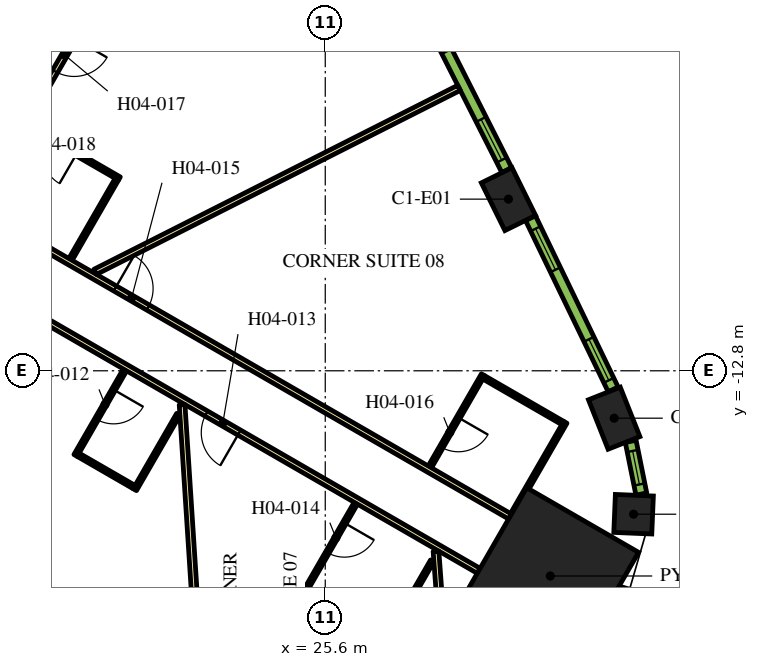
"""IFC4 building model, lengths in metres.
Left out: names, types, materials, properties, quantities, classifications, styles, units other than length and angle.
Written with IfcOpenShell. Run it as: python <this file> out.ifc"""

import sys

from ifc_helpers import new_model, si_unit, direction, frame, frame_2d, origin, origin_2d, place, context, subcontext, project, spatial, rectangle, extrude, element, fill, save


model = new_model("IFC4")
c1 = context("Model", 3, precision=1e-05, world=origin(), true_north=direction((0.0, 1.0)))
c2 = subcontext(c1, "Body", "Model", "MODEL_VIEW")
j1 = project(units=[si_unit("LENGTHUNIT", "METRE"), si_unit("PLANEANGLEUNIT", "RADIAN")], contexts=[c1])
p1 = place(None, origin())
s1 = spatial("IfcSite", under=j1, at=p1, CompositionType="ELEMENT")
p2 = place(p1, origin())
s2 = spatial("IfcBuilding", under=s1, at=p2, CompositionType="ELEMENT")
p3 = place(p2, frame((0.0, 0.0, 66.6)))
s3 = spatial("IfcBuildingStorey", under=s2, at=p3, CompositionType="ELEMENT", Elevation=66.6)
p4 = place(p3, frame((31.522, -18.199, 0.0), z_axis=(0.0, 0.0, 1.0), x_axis=(0.866025403784, -0.5, 0.0)))
e1 = element("IfcColumn", 1, at=p4, inside=s3, PredefinedType="COLUMN", context=c2, shape_type="SweptSolid", body=[
    extrude(rectangle(XDim=3.4, YDim=3.4, at=origin_2d()), origin(), (0.0, 0.0, 1.0), 3.9),
])
p5 = place(p3, frame((33.713, -16.574, 0.0), z_axis=(0.0, 0.0, 1.0), x_axis=(0.041582693819, 0.999135065732, 0.0)))
e2 = element("IfcColumn", 2, at=p5, inside=s3, PredefinedType="COLUMN", context=c2, shape_type="SweptSolid", body=[
    extrude(rectangle(XDim=1.0, YDim=1.0, at=origin_2d()), origin(), (0.0, 0.0, 1.0), 3.9),
])
for number, where, z_axis, x_axis in (
    (3, (33.203, -14.047, 0.0), (0.0, 0.0, 1.0), (-0.369, 0.929, 0.0)),
    (4, (30.421, -8.284, 0.0), (0.0, 0.0, 1.0), (-0.443, 0.897, 0.0)),
):
    element("IfcColumn", number, at=place(p3, frame(where, z_axis=z_axis, x_axis=x_axis)), inside=s3, PredefinedType="COLUMN", context=c2, shape_type="SweptSolid", body=[
        extrude(rectangle(XDim=1.4, YDim=0.9, at=origin_2d()), origin(), (0.0, 0.0, 1.0), 3.9),
    ])
p6 = place(p3, frame((16.412, -8.523, 0.0), z_axis=(0.0, 0.0, 1.0), x_axis=(0.866022197818, -0.500005552856, 0.0)))
e5 = element("IfcWall", 5, at=p6, inside=s3, PredefinedType="PARTITIONING", context=c2, shape_type="SweptSolid", body=[
    extrude(rectangle(XDim=16.224, YDim=0.15, at=frame_2d((8.112, 0.0))), origin(), (0.0, 0.0, 1.0), 2.75),
])
p7 = place(p6, frame((4.223, 0.0, 0.0)))
e6 = element("IfcOpeningElement", 6, at=p7, cuts=e5, PredefinedType="OPENING", context=c2, shape_type="SweptSolid", body=[
    extrude(rectangle(XDim=1.0, YDim=2.1, at=frame_2d((0.5, 1.05))), frame((0.0, 0.085, 0.0), z_axis=(0.0, -1.0, 0.0), x_axis=(1.0, 0.0, 0.0)), (0.0, 0.0, 1.0), 0.17),
])
p8 = place(p3, frame((19.081, -3.9, 0.0), z_axis=(0.0, 0.0, 1.0), x_axis=(-0.499974327079, -0.866040225545, 0.0)))
e7 = element("IfcWall", 7, at=p8, inside=s3, PredefinedType="PARTITIONING", context=c2, shape_type="SweptSolid", body=[
    extrude(rectangle(XDim=5.258, YDim=0.15, at=frame_2d((2.629, 0.0))), origin(), (0.0, 0.0, 1.0), 2.75),
])
p9 = place(p8, frame((0.18, 0.0, 0.0)))
e8 = element("IfcOpeningElement", 8, at=p9, cuts=e7, PredefinedType="OPENING", context=c2, shape_type="SweptSolid", body=[
    extrude(rectangle(XDim=1.0, YDim=2.1, at=frame_2d((0.5, 1.05))), frame((0.0, 0.085, 0.0), z_axis=(0.0, -1.0, 0.0), x_axis=(1.0, 0.0, 0.0)), (0.0, 0.0, 1.0), 0.17),
])
p10 = place(p3, frame((29.638, -18.064, 0.0), z_axis=(0.0, 0.0, 1.0), x_axis=(-0.866026175601, 0.499998663172, 0.0)))
e9 = element("IfcWall", 9, at=p10, inside=s3, PredefinedType="PARTITIONING", context=c2, shape_type="SweptSolid", body=[
    extrude(rectangle(XDim=16.144, YDim=0.15, at=frame_2d((8.072, 0.0))), origin(), (0.0, 0.0, 1.0), 2.75),
])
p11 = place(p10, frame((14.714, 0.0, 0.0)))
e10 = element("IfcOpeningElement", 10, at=p11, cuts=e9, PredefinedType="OPENING", context=c2, shape_type="SweptSolid", body=[
    extrude(rectangle(XDim=1.0, YDim=2.1, at=frame_2d((0.5, 1.05))), frame((0.0, 0.085, 0.0), z_axis=(0.0, -1.0, 0.0), x_axis=(1.0, 0.0, 0.0)), (0.0, 0.0, 1.0), 0.17),
])
p12 = place(p10, frame((7.275, 0.0, 0.0)))
e11 = element("IfcOpeningElement", 11, at=p12, cuts=e9, PredefinedType="OPENING", context=c2, shape_type="SweptSolid", body=[
    extrude(rectangle(XDim=1.0, YDim=2.1, at=frame_2d((0.5, 1.05))), frame((0.0, 0.085, 0.0), z_axis=(0.0, -1.0, 0.0), x_axis=(1.0, 0.0, 0.0)), (0.0, 0.0, 1.0), 0.17),
])
p13 = place(p3, frame((29.12, -5.356, 0.0), z_axis=(0.0, 0.0, 1.0), x_axis=(-0.892401965553, -0.451241323327, 0.0)))
e12 = element("IfcWall", 12, at=p13, inside=s3, PredefinedType="PARTITIONING", context=c2, shape_type="SweptSolid", body=[
    extrude(rectangle(XDim=10.729, YDim=0.15, at=frame_2d((5.364, 0.0))), origin(), (0.0, 0.0, 1.0), 2.75),
])
p14 = place(p3, frame((22.355, -21.754, 0.0), z_axis=(0.0, 0.0, 1.0), x_axis=(-0.064639533143, 0.997908678565, 0.0)))
e13 = element("IfcWall", 13, at=p14, inside=s3, PredefinedType="PARTITIONING", context=c2, shape_type="SweptSolid", body=[
    extrude(rectangle(XDim=8.079, YDim=0.15, at=frame_2d((4.04, 0.0))), origin(), (0.0, 0.0, 1.0), 2.75),
])
p15 = place(p3, frame((28.79, -21.273, 0.0), z_axis=(0.0, 0.0, 1.0), x_axis=(-0.07382592098, 0.997271143366, 0.0)))
e14 = element("IfcWall", 14, at=p15, inside=s3, PredefinedType="PARTITIONING", context=c2, shape_type="SweptSolid", body=[
    extrude(rectangle(XDim=3.734, YDim=0.15, at=frame_2d((1.867, 0.0))), origin(), (0.0, 0.0, 1.0), 2.75),
])
p16 = place(p3, frame((20.33, -12.777, 0.0), z_axis=(0.0, 0.0, 1.0), x_axis=(-0.500006934395, -0.866021400173, 0.0)))
e15 = element("IfcWall", 15, at=p16, inside=s3, PredefinedType="PARTITIONING", context=c2, shape_type="SweptSolid", body=[
    extrude(rectangle(XDim=2.6, YDim=0.1, at=frame_2d((1.3, 0.0))), origin(), (0.0, 0.0, 1.0), 2.75),
])
p17 = place(p16, frame((0.6, 0.0, 0.0)))
e16 = element("IfcOpeningElement", 16, at=p17, cuts=e15, PredefinedType="OPENING", context=c2, shape_type="SweptSolid", body=[
    extrude(rectangle(XDim=0.9, YDim=2.1, at=frame_2d((0.45, 1.05))), frame((0.0, 0.06, 0.0), z_axis=(0.0, -1.0, 0.0), x_axis=(1.0, 0.0, 0.0)), (0.0, 0.0, 1.0), 0.12),
])
p18 = place(p3, frame((19.098, -15.01, 0.0), z_axis=(0.0, 0.0, 1.0), x_axis=(0.86605165483, -0.499954529098, 0.0)))
e17 = element("IfcWall", 17, at=p18, inside=s3, PredefinedType="PARTITIONING", context=c2, shape_type="SweptSolid", body=[
    extrude(rectangle(XDim=1.7, YDim=0.1, at=frame_2d((0.85, 0.0))), origin(), (0.0, 0.0, 1.0), 2.75),
])
p19 = place(p3, frame((21.734, -13.945, 0.0), z_axis=(0.0, 0.0, 1.0), x_axis=(-0.500014693593, -0.866016920268, 0.0)))
e18 = element("IfcWall", 18, at=p19, inside=s3, PredefinedType="PARTITIONING", context=c2, shape_type="SweptSolid", body=[
    extrude(rectangle(XDim=2.29, YDim=0.1, at=frame_2d((1.145, 0.0))), origin(), (0.0, 0.0, 1.0), 2.75),
])
p20 = place(p3, frame((26.405, -16.284, 0.0), z_axis=(0.0, 0.0, 1.0), x_axis=(-0.49998411664, -0.866034573852, 0.0)))
e19 = element("IfcWall", 19, at=p20, inside=s3, PredefinedType="PARTITIONING", context=c2, shape_type="SweptSolid", body=[
    extrude(rectangle(XDim=2.8, YDim=0.1, at=frame_2d((1.4, 0.0))), origin(), (0.0, 0.0, 1.0), 2.75),
])
p21 = place(p20, frame((0.6, 0.0, 0.0)))
e20 = element("IfcOpeningElement", 20, at=p21, cuts=e19, PredefinedType="OPENING", context=c2, shape_type="SweptSolid", body=[
    extrude(rectangle(XDim=0.9, YDim=2.1, at=frame_2d((0.45, 1.05))), frame((0.0, 0.06, 0.0), z_axis=(0.0, -1.0, 0.0), x_axis=(1.0, 0.0, 0.0)), (0.0, 0.0, 1.0), 0.12),
])
p22 = place(p3, frame((28.415, -17.802, 0.0), z_axis=(0.0, 0.0, 1.0), x_axis=(-0.499945955465, -0.866056604163, 0.0)))
e21 = element("IfcWall", 21, at=p22, inside=s3, PredefinedType="PARTITIONING", context=c2, shape_type="SweptSolid", body=[
    extrude(rectangle(XDim=2.49, YDim=0.1, at=frame_2d((1.245, 0.0))), origin(), (0.0, 0.0, 1.0), 2.75),
])
p23 = place(p3, frame((29.752, -12.905, 0.0), z_axis=(0.0, 0.0, 1.0), x_axis=(-0.500049511043, -0.865996816683, 0.0)))
e22 = element("IfcWall", 22, at=p23, inside=s3, PredefinedType="PARTITIONING", context=c2, shape_type="SweptSolid", body=[
    extrude(rectangle(XDim=2.8, YDim=0.1, at=frame_2d((1.4, 0.0))), origin(), (0.0, 0.0, 1.0), 2.75),
])
p24 = place(p23, frame((1.3, 0.0, 0.0)))
e23 = element("IfcOpeningElement", 23, at=p24, cuts=e22, PredefinedType="OPENING", context=c2, shape_type="SweptSolid", body=[
    extrude(rectangle(XDim=0.9, YDim=2.1, at=frame_2d((0.45, 1.05))), frame((0.0, 0.06, 0.0), z_axis=(0.0, -1.0, 0.0), x_axis=(1.0, 0.0, 0.0)), (0.0, 0.0, 1.0), 0.12),
])
p25 = place(p3, frame((29.771, -12.973, 0.0), z_axis=(0.0, 0.0, 1.0), x_axis=(0.865980596518, -0.500077600433, 0.0)))
e24 = element("IfcWall", 24, at=p25, inside=s3, PredefinedType="PARTITIONING", context=c2, shape_type="SweptSolid", body=[
    extrude(rectangle(XDim=2.4, YDim=0.1, at=frame_2d((1.2, 0.0))), origin(), (0.0, 0.0, 1.0), 2.75),
])
p26 = place(p3, frame((30.518, -16.58, 0.0), z_axis=(0.0, 0.0, 1.0), x_axis=(0.49998411664, 0.866034573852, 0.0)))
e25 = element("IfcWall", 25, at=p26, inside=s3, PredefinedType="PARTITIONING", context=c2, shape_type="SweptSolid", body=[
    extrude(rectangle(XDim=2.8, YDim=0.1, at=frame_2d((1.4, 0.0))), origin(), (0.0, 0.0, 1.0), 2.75),
])
p27 = place(p3, frame((20.182, -7.743, 0.0), z_axis=(0.0, 0.0, 1.0), x_axis=(-0.866034573852, 0.49998411664, 0.0)))
e26 = element("IfcWall", 26, at=p27, inside=s3, PredefinedType="PARTITIONING", context=c2, shape_type="SweptSolid", body=[
    extrude(rectangle(XDim=2.8, YDim=0.1, at=frame_2d((1.4, 0.0))), origin(), (0.0, 0.0, 1.0), 2.75),
])
p28 = place(p27, frame((1.3, 0.0, 0.0)))
e27 = element("IfcOpeningElement", 27, at=p28, cuts=e26, PredefinedType="OPENING", context=c2, shape_type="SweptSolid", body=[
    extrude(rectangle(XDim=0.9, YDim=2.1, at=frame_2d((0.45, 1.05))), frame((0.0, 0.06, 0.0), z_axis=(0.0, -1.0, 0.0), x_axis=(1.0, 0.0, 0.0)), (0.0, 0.0, 1.0), 0.12),
])
p29 = place(p3, frame((20.109, -7.771, 0.0), z_axis=(0.0, 0.0, 1.0), x_axis=(-0.500077573772, -0.865980611914, 0.0)))
e28 = element("IfcWall", 28, at=p29, inside=s3, PredefinedType="PARTITIONING", context=c2, shape_type="SweptSolid", body=[
    extrude(rectangle(XDim=2.42, YDim=0.1, at=frame_2d((1.21, 0.0))), origin(), (0.0, 0.0, 1.0), 2.75),
])
p30 = place(p3, frame((33.257, -19.241, 0.0), z_axis=(0.0, 0.0, 1.0), x_axis=(0.278981320915, 0.960296528464, 0.0)))
e29 = element("IfcWall", 29, at=p30, inside=s3, PredefinedType="SOLIDWALL", context=c2, shape_type="SweptSolid", body=[
    extrude(rectangle(XDim=0.764, YDim=0.29, at=frame_2d((0.382, 0.0))), origin(), (0.0, 0.0, 1.0), 3.65),
])
p31 = place(p3, frame((33.917, -16.044, 0.0), z_axis=(0.0, 0.0, 1.0), x_axis=(-0.198106888228, 0.980180422594, 0.0)))
e30 = element("IfcWall", 30, at=p31, inside=s3, PredefinedType="SOLIDWALL", context=c2, shape_type="SweptSolid", body=[
    extrude(rectangle(XDim=1.415, YDim=0.29, at=frame_2d((0.708, 0.0))), origin(), (0.0, 0.0, 1.0), 3.65),
])
p32 = place(p31, frame((0.257, 0.0, 0.9)))
e31 = element("IfcOpeningElement", 31, at=p32, cuts=e30, PredefinedType="OPENING", context=c2, shape_type="SweptSolid", body=[
    extrude(rectangle(XDim=0.9, YDim=2.15, at=frame_2d((0.45, 1.075))), frame((0.0, 0.155, 0.0), z_axis=(0.0, -1.0, 0.0), x_axis=(1.0, 0.0, 0.0)), (0.0, 0.0, 1.0), 0.31),
])
p33 = place(p3, frame((33.176, -13.29, 0.0), z_axis=(0.0, 0.0, 1.0), x_axis=(-0.434664499056, 0.900592456808, 0.0)))
e32 = element("IfcWall", 32, at=p33, inside=s3, PredefinedType="SOLIDWALL", context=c2, shape_type="SweptSolid", body=[
    extrude(rectangle(XDim=5.006, YDim=0.29, at=frame_2d((2.503, 0.0))), origin(), (0.0, 0.0, 1.0), 3.65),
])
p34 = place(p33, frame((0.265, 0.0, 0.9)))
e33 = element("IfcOpeningElement", 33, at=p34, cuts=e32, PredefinedType="OPENING", context=c2, shape_type="SweptSolid", body=[
    extrude(rectangle(XDim=1.2, YDim=2.15, at=frame_2d((0.6, 1.075))), frame((0.0, 0.155, 0.0), z_axis=(0.0, -1.0, 0.0), x_axis=(1.0, 0.0, 0.0)), (0.0, 0.0, 1.0), 0.31),
])
p35 = place(p33, frame((3.496, 0.0, 0.9)))
e34 = element("IfcOpeningElement", 34, at=p35, cuts=e32, PredefinedType="OPENING", context=c2, shape_type="SweptSolid", body=[
    extrude(rectangle(XDim=1.2, YDim=2.15, at=frame_2d((0.6, 1.075))), frame((0.0, 0.155, 0.0), z_axis=(0.0, -1.0, 0.0), x_axis=(1.0, 0.0, 0.0)), (0.0, 0.0, 1.0), 0.31),
])
p36 = place(p3, frame((30.377, -7.521, 0.0), z_axis=(0.0, 0.0, 1.0), x_axis=(-0.451233929645, 0.892405704115, 0.0)))
e35 = element("IfcWall", 35, at=p36, inside=s3, PredefinedType="SOLIDWALL", context=c2, shape_type="SweptSolid", body=[
    extrude(rectangle(XDim=4.998, YDim=0.29, at=frame_2d((2.499, 0.0))), origin(), (0.0, 0.0, 1.0), 3.65),
])
p37 = place(p36, frame((0.297, 0.0, 0.9)))
e36 = element("IfcOpeningElement", 36, at=p37, cuts=e35, PredefinedType="OPENING", context=c2, shape_type="SweptSolid", body=[
    extrude(rectangle(XDim=1.2, YDim=2.15, at=frame_2d((0.6, 1.075))), frame((0.0, 0.155, 0.0), z_axis=(0.0, -1.0, 0.0), x_axis=(1.0, 0.0, 0.0)), (0.0, 0.0, 1.0), 0.31),
])
p38 = place(p36, frame((3.501, 0.0, 0.9)))
e37 = element("IfcOpeningElement", 37, at=p38, cuts=e35, PredefinedType="OPENING", context=c2, shape_type="SweptSolid", body=[
    extrude(rectangle(XDim=1.2, YDim=2.15, at=frame_2d((0.6, 1.075))), frame((0.0, 0.155, 0.0), z_axis=(0.0, -1.0, 0.0), x_axis=(1.0, 0.0, 0.0)), (0.0, 0.0, 1.0), 0.31),
])
p39 = place(p17, origin())
e38 = element("IfcDoor", 38, at=p39, inside=s3, OperationType="SINGLE_SWING_RIGHT", PredefinedType="DOOR", context=c2, shape_type="SweptSolid", body=[
    extrude(rectangle(XDim=0.9, YDim=2.1, at=frame_2d((0.45, 1.05))), frame((0.0, 0.025, 0.0), z_axis=(0.0, -1.0, 0.0), x_axis=(1.0, 0.0, 0.0)), (0.0, 0.0, 1.0), 0.05),
])
fill(e16, e38)
p40 = place(p12, origin())
e39 = element("IfcDoor", 39, at=p40, inside=s3, OperationType="SINGLE_SWING_RIGHT", PredefinedType="DOOR", context=c2, shape_type="SweptSolid", body=[
    extrude(rectangle(XDim=1.0, YDim=2.1, at=frame_2d((0.5, 1.05))), frame((0.0, 0.025, 0.0), z_axis=(0.0, -1.0, 0.0), x_axis=(1.0, 0.0, 0.0)), (0.0, 0.0, 1.0), 0.05),
])
fill(e11, e39)
p41 = place(p21, origin())
e40 = element("IfcDoor", 40, at=p41, inside=s3, OperationType="SINGLE_SWING_LEFT", PredefinedType="DOOR", context=c2, shape_type="SweptSolid", body=[
    extrude(rectangle(XDim=0.9, YDim=2.1, at=frame_2d((0.45, 1.05))), frame((0.0, 0.025, 0.0), z_axis=(0.0, -1.0, 0.0), x_axis=(1.0, 0.0, 0.0)), (0.0, 0.0, 1.0), 0.05),
])
fill(e20, e40)
p42 = place(p7, origin())
e41 = element("IfcDoor", 41, at=p42, inside=s3, OperationType="SINGLE_SWING_LEFT", PredefinedType="DOOR", context=c2, shape_type="SweptSolid", body=[
    extrude(rectangle(XDim=1.0, YDim=2.1, at=frame_2d((0.5, 1.05))), frame((0.0, 0.025, 0.0), z_axis=(0.0, -1.0, 0.0), x_axis=(1.0, 0.0, 0.0)), (0.0, 0.0, 1.0), 0.05),
])
fill(e6, e41)
p43 = place(p24, origin())
e42 = element("IfcDoor", 42, at=p43, inside=s3, OperationType="SINGLE_SWING_LEFT", PredefinedType="DOOR", context=c2, shape_type="SweptSolid", body=[
    extrude(rectangle(XDim=0.9, YDim=2.1, at=frame_2d((0.45, 1.05))), frame((0.0, 0.025, 0.0), z_axis=(0.0, -1.0, 0.0), x_axis=(1.0, 0.0, 0.0)), (0.0, 0.0, 1.0), 0.05),
])
fill(e23, e42)
p44 = place(p9, origin())
e43 = element("IfcDoor", 43, at=p44, inside=s3, OperationType="SINGLE_SWING_LEFT", PredefinedType="DOOR", context=c2, shape_type="SweptSolid", body=[
    extrude(rectangle(XDim=1.0, YDim=2.1, at=frame_2d((0.5, 1.05))), frame((0.0, 0.025, 0.0), z_axis=(0.0, -1.0, 0.0), x_axis=(1.0, 0.0, 0.0)), (0.0, 0.0, 1.0), 0.05),
])
fill(e8, e43)
p45 = place(p28, origin())
e44 = element("IfcDoor", 44, at=p45, inside=s3, OperationType="SINGLE_SWING_RIGHT", PredefinedType="DOOR", context=c2, shape_type="SweptSolid", body=[
    extrude(rectangle(XDim=0.9, YDim=2.1, at=frame_2d((0.45, 1.05))), frame((0.0, 0.025, 0.0), z_axis=(0.0, -1.0, 0.0), x_axis=(1.0, 0.0, 0.0)), (0.0, 0.0, 1.0), 0.05),
])
fill(e27, e44)
p46 = place(p32, origin())
e45 = element("IfcWindow", 45, at=p46, inside=s3, PartitioningType="SINGLE_PANEL", PredefinedType="WINDOW", context=c2, shape_type="SweptSolid", body=[
    extrude(rectangle(XDim=0.9, YDim=2.15, at=frame_2d((0.45, 1.075))), frame((0.0, 0.015, 0.0), z_axis=(0.0, -1.0, 0.0), x_axis=(1.0, 0.0, 0.0)), (0.0, 0.0, 1.0), 0.06),
])
fill(e31, e45)
p47 = place(p34, origin())
e46 = element("IfcWindow", 46, at=p47, inside=s3, PartitioningType="DOUBLE_PANEL_VERTICAL", PredefinedType="WINDOW", context=c2, shape_type="SweptSolid", body=[
    extrude(rectangle(XDim=1.2, YDim=2.15, at=frame_2d((0.6, 1.075))), frame((0.0, 0.015, 0.0), z_axis=(0.0, -1.0, 0.0), x_axis=(1.0, 0.0, 0.0)), (0.0, 0.0, 1.0), 0.06),
])
fill(e33, e46)
p48 = place(p35, origin())
e47 = element("IfcWindow", 47, at=p48, inside=s3, PartitioningType="DOUBLE_PANEL_VERTICAL", PredefinedType="WINDOW", context=c2, shape_type="SweptSolid", body=[
    extrude(rectangle(XDim=1.2, YDim=2.15, at=frame_2d((0.6, 1.075))), frame((0.0, 0.015, 0.0), z_axis=(0.0, -1.0, 0.0), x_axis=(1.0, 0.0, 0.0)), (0.0, 0.0, 1.0), 0.06),
])
fill(e34, e47)
p49 = place(p37, origin())
e48 = element("IfcWindow", 48, at=p49, inside=s3, PartitioningType="DOUBLE_PANEL_VERTICAL", PredefinedType="WINDOW", context=c2, shape_type="SweptSolid", body=[
    extrude(rectangle(XDim=1.2, YDim=2.15, at=frame_2d((0.6, 1.075))), frame((0.0, 0.015, 0.0), z_axis=(0.0, -1.0, 0.0), x_axis=(1.0, 0.0, 0.0)), (0.0, 0.0, 1.0), 0.06),
])
fill(e36, e48)
save(model, sys.argv[1])
